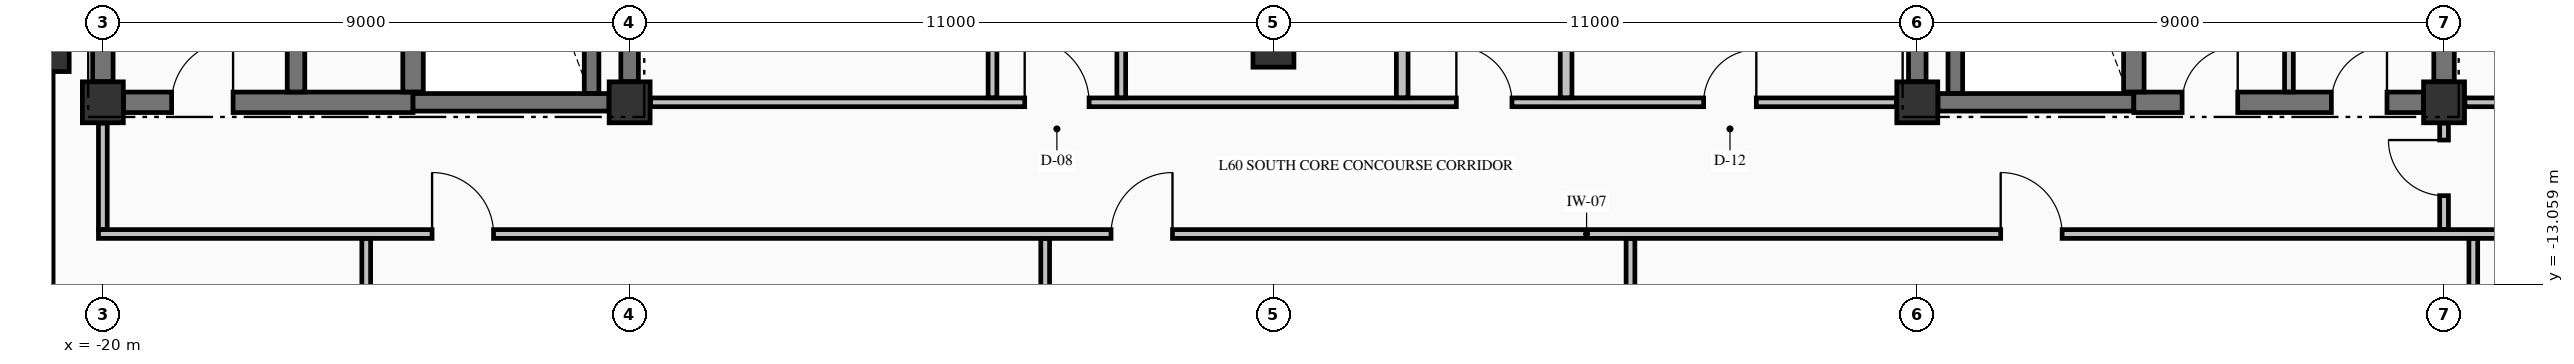
"""IFC4 building model, lengths in metres.
Left out: names, types, materials, properties, quantities, classifications, styles, units other than length and angle.
Written with IfcOpenShell. Run it as: python <this file> out.ifc"""

import sys

from ifc_helpers import new_model, si_unit, direction, frame, frame_2d, origin, origin_2d, place, context, subcontext, project, spatial, rectangle, extrude, element, fill, save


model = new_model("IFC4")
c1 = context("Model", 3, precision=1e-05, world=origin(), true_north=direction((0.0, 1.0)))
c2 = subcontext(c1, "Body", "Model", "MODEL_VIEW")
j1 = project(units=[si_unit("LENGTHUNIT", "METRE"), si_unit("PLANEANGLEUNIT", "RADIAN")], contexts=[c1])
p1 = place(None, origin())
s1 = spatial("IfcSite", under=j1, at=p1, CompositionType="ELEMENT")
p2 = place(p1, origin())
s2 = spatial("IfcBuilding", under=s1, at=p2, CompositionType="ELEMENT")
p3 = place(p2, frame((0.0, 0.0, 230.05)))
s3 = spatial("IfcBuildingStorey", under=s2, at=p3, CompositionType="ELEMENT", Elevation=230.05)
p4 = place(p3, frame((-21.0, -9.0, -0.25), z_axis=(0.0, 0.0, 1.0), x_axis=(1.0, 0.0, 0.0)))
e1 = element("IfcColumn", 1, at=p4, inside=s3, PredefinedType="COLUMN", context=c2, shape_type="SweptSolid", body=[
    extrude(rectangle(XDim=0.85, YDim=0.85, at=origin_2d()), origin(), (0.0, 0.0, 1.0), 3.23),
])
for number, where, z_axis, x_axis in (
    (2, (-20.0, -9.95, -0.25), (0.0, 0.0, 1.0), (1.0, 0.0, 0.0)),
    (3, (-11.0, -9.95, -0.25), (0.0, 0.0, 1.0), (1.0, 0.0, 0.0)),
    (4, (11.0, -9.95, -0.25), (0.0, 0.0, 1.0), (1.0, 0.0, 0.0)),
    (5, (20.0, -9.95, -0.25), (0.0, 0.0, 1.0), (1.0, 0.0, 0.0)),
    (6, (0.0, -9.0, -0.25), (0.0, 0.0, 1.0), (1.0, 0.0, 0.0)),
):
    element("IfcColumn", number, at=place(p3, frame(where, z_axis=z_axis, x_axis=x_axis)), inside=s3, PredefinedType="COLUMN", context=c2, shape_type="SweptSolid", body=[
        extrude(rectangle(XDim=0.7, YDim=0.7, at=origin_2d()), origin(), (0.0, 0.0, 1.0), 3.23),
    ])
p5 = place(p3, frame((-21.0, -9.455, 0.0), z_axis=(0.0, 0.0, 1.0), x_axis=(0.0, -1.0, 0.0)))
e7 = element("IfcWall", 7, at=p5, inside=s3, PredefinedType="STANDARD", context=c2, shape_type="SweptSolid", body=[
    extrude(rectangle(XDim=8.09, YDim=0.3, at=frame_2d((4.045, 0.0))), origin(), (0.0, 0.0, 1.0), 2.372),
])
p6 = place(p3, frame((-19.646, -9.95, 0.0), z_axis=(0.0, 0.0, 1.0), x_axis=(1.0, 0.0, 0.0)))
e8 = element("IfcWall", 8, at=p6, inside=s3, PredefinedType="SHEAR", context=c2, shape_type="SweptSolid", body=[
    extrude(rectangle(XDim=4.946, YDim=0.35, at=frame_2d((2.473, 0.0))), origin(), (0.0, 0.0, 1.0), 2.98),
])
p7 = place(p6, frame((0.821, 0.0, 0.0)))
e9 = element("IfcOpeningElement", 9, at=p7, cuts=e8, PredefinedType="OPENING", context=c2, shape_type="SweptSolid", body=[
    extrude(rectangle(XDim=1.05, YDim=2.15, at=frame_2d((0.525, 1.075))), frame((0.0, 0.185, 0.0), z_axis=(0.0, -1.0, 0.0), x_axis=(1.0, 0.0, 0.0)), (0.0, 0.0, 1.0), 0.37),
])
for number, where, z_axis, x_axis in (
    (10, (-14.7, -9.95, 0.0), (0.0, 0.0, 1.0), (1.0, 0.0, 0.0)),
    (11, (11.354, -9.95, 0.0), (0.0, 0.0, 1.0), (1.0, 0.0, 0.0)),
):
    element("IfcWall", number, at=place(p3, frame(where, z_axis=z_axis, x_axis=x_axis)), inside=s3, PredefinedType="SHEAR", context=c2, shape_type="SweptSolid", body=[
        extrude(rectangle(XDim=3.346, YDim=0.3, at=frame_2d((1.673, 0.0))), origin(), (0.0, 0.0, 1.0), 2.98),
    ])
p8 = place(p3, frame((14.7, -9.95, 0.0), z_axis=(0.0, 0.0, 1.0), x_axis=(1.0, 0.0, 0.0)))
e12 = element("IfcWall", 12, at=p8, inside=s3, PredefinedType="SHEAR", context=c2, shape_type="SweptSolid", body=[
    extrude(rectangle(XDim=4.946, YDim=0.35, at=frame_2d((2.473, 0.0))), origin(), (0.0, 0.0, 1.0), 2.98),
])
p9 = place(p8, frame((0.825, 0.0, 0.0)))
e13 = element("IfcOpeningElement", 13, at=p9, cuts=e12, PredefinedType="OPENING", context=c2, shape_type="SweptSolid", body=[
    extrude(rectangle(XDim=0.95, YDim=2.15, at=frame_2d((0.475, 1.075))), frame((0.0, 0.185, 0.0), z_axis=(0.0, -1.0, 0.0), x_axis=(1.0, 0.0, 0.0)), (0.0, 0.0, 1.0), 0.37),
])
p10 = place(p8, frame((3.375, 0.0, 0.0)))
e14 = element("IfcOpeningElement", 14, at=p10, cuts=e12, PredefinedType="OPENING", context=c2, shape_type="SweptSolid", body=[
    extrude(rectangle(XDim=0.95, YDim=2.15, at=frame_2d((0.475, 1.075))), frame((0.0, 0.185, 0.0), z_axis=(0.0, -1.0, 0.0), x_axis=(1.0, 0.0, 0.0)), (0.0, 0.0, 1.0), 0.37),
])
p11 = place(p3, frame((-20.075, -12.2, 0.0), z_axis=(0.0, 0.0, 1.0), x_axis=(1.0, 0.0, 0.0)))
e15 = element("IfcWall", 15, at=p11, inside=s3, PredefinedType="PARTITIONING", context=c2, shape_type="SweptSolid", body=[
    extrude(rectangle(XDim=45.91, YDim=0.15, at=frame_2d((22.955, 0.0))), origin(), (0.0, 0.0, 1.0), 2.98),
])
p12 = place(p11, frame((5.7, 0.0, 0.0)))
e16 = element("IfcOpeningElement", 16, at=p12, cuts=e15, PredefinedType="OPENING", context=c2, shape_type="SweptSolid", body=[
    extrude(rectangle(XDim=1.05, YDim=2.15, at=frame_2d((0.525, 1.075))), frame((0.0, 0.085, 0.0), z_axis=(0.0, -1.0, 0.0), x_axis=(1.0, 0.0, 0.0)), (0.0, 0.0, 1.0), 0.17),
])
p13 = place(p11, frame((17.3, 0.0, 0.0)))
e17 = element("IfcOpeningElement", 17, at=p13, cuts=e15, PredefinedType="OPENING", context=c2, shape_type="SweptSolid", body=[
    extrude(rectangle(XDim=1.05, YDim=2.15, at=frame_2d((0.525, 1.075))), frame((0.0, 0.085, 0.0), z_axis=(0.0, -1.0, 0.0), x_axis=(1.0, 0.0, 0.0)), (0.0, 0.0, 1.0), 0.17),
])
p14 = place(p11, frame((32.5, 0.0, 0.0)))
e18 = element("IfcOpeningElement", 18, at=p14, cuts=e15, PredefinedType="OPENING", context=c2, shape_type="SweptSolid", body=[
    extrude(rectangle(XDim=1.05, YDim=2.15, at=frame_2d((0.525, 1.075))), frame((0.0, 0.085, 0.0), z_axis=(0.0, -1.0, 0.0), x_axis=(1.0, 0.0, 0.0)), (0.0, 0.0, 1.0), 0.17),
])
p15 = place(p3, frame((-10.644, -9.95, 0.0), z_axis=(0.0, 0.0, 1.0), x_axis=(1.0, 0.0, 0.0)))
e19 = element("IfcWall", 19, at=p15, inside=s3, PredefinedType="PARTITIONING", context=c2, shape_type="SweptSolid", body=[
    extrude(rectangle(XDim=21.288, YDim=0.15, at=frame_2d((10.644, 0.0))), origin(), (0.0, 0.0, 1.0), 2.98),
])
p16 = place(p15, frame((6.394, 0.0, 0.0)))
e20 = element("IfcOpeningElement", 20, at=p16, cuts=e19, PredefinedType="OPENING", context=c2, shape_type="SweptSolid", body=[
    extrude(rectangle(XDim=1.1, YDim=2.15, at=frame_2d((0.55, 1.075))), frame((0.0, 0.085, 0.0), z_axis=(0.0, -1.0, 0.0), x_axis=(1.0, 0.0, 0.0)), (0.0, 0.0, 1.0), 0.17),
])
p17 = place(p15, frame((13.769, 0.0, 0.0)))
e21 = element("IfcOpeningElement", 21, at=p17, cuts=e19, PredefinedType="OPENING", context=c2, shape_type="SweptSolid", body=[
    extrude(rectangle(XDim=0.95, YDim=2.15, at=frame_2d((0.475, 1.075))), frame((0.0, 0.085, 0.0), z_axis=(0.0, -1.0, 0.0), x_axis=(1.0, 0.0, 0.0)), (0.0, 0.0, 1.0), 0.17),
])
p18 = place(p15, frame((17.994, 0.0, 0.0)))
e22 = element("IfcOpeningElement", 22, at=p18, cuts=e19, PredefinedType="OPENING", context=c2, shape_type="SweptSolid", body=[
    extrude(rectangle(XDim=0.9, YDim=2.15, at=frame_2d((0.45, 1.075))), frame((0.0, 0.085, 0.0), z_axis=(0.0, -1.0, 0.0), x_axis=(1.0, 0.0, 0.0)), (0.0, 0.0, 1.0), 0.17),
])
p19 = place(p3, frame((20.356, -9.95, 0.0), z_axis=(0.0, 0.0, 1.0), x_axis=(1.0, 0.0, 0.0)))
e23 = element("IfcWall", 23, at=p19, inside=s3, PredefinedType="PARTITIONING", context=c2, shape_type="SweptSolid", body=[
    extrude(rectangle(XDim=5.479, YDim=0.15, at=frame_2d((2.74, 0.0))), origin(), (0.0, 0.0, 1.0), 2.98),
])
p20 = place(p19, frame((2.144, 0.0, 0.0)))
e24 = element("IfcOpeningElement", 24, at=p20, cuts=e23, PredefinedType="OPENING", context=c2, shape_type="SweptSolid", body=[
    extrude(rectangle(XDim=1.0, YDim=2.15, at=frame_2d((0.5, 1.075))), frame((0.0, 0.085, 0.0), z_axis=(0.0, -1.0, 0.0), x_axis=(1.0, 0.0, 0.0)), (0.0, 0.0, 1.0), 0.17),
])
p21 = place(p3, frame((-20.0, -9.596, 0.0), z_axis=(0.0, 0.0, 1.0), x_axis=(0.0, 1.0, 0.0)))
e25 = element("IfcWall", 25, at=p21, inside=s3, PredefinedType="SHEAR", context=c2, shape_type="SweptSolid", body=[
    extrude(rectangle(XDim=9.194, YDim=0.35, at=frame_2d((4.597, 0.0))), origin(), (0.0, 0.0, 1.0), 2.98),
])
p22 = place(p3, frame((-16.7, -9.773, 0.0), z_axis=(0.0, 0.0, 1.0), x_axis=(0.0, 1.0, 0.0)))
e26 = element("IfcWall", 26, at=p22, inside=s3, PredefinedType="SHEAR", context=c2, shape_type="SweptSolid", body=[
    extrude(rectangle(XDim=9.371, YDim=0.3, at=frame_2d((4.686, 0.0))), origin(), (0.0, 0.0, 1.0), 2.98),
])
p23 = place(p3, frame((-14.7, -9.773, 0.0), z_axis=(0.0, 0.0, 1.0), x_axis=(0.0, 1.0, 0.0)))
e27 = element("IfcWall", 27, at=p23, inside=s3, PredefinedType="SHEAR", context=c2, shape_type="SweptSolid", body=[
    extrude(rectangle(XDim=9.371, YDim=0.35, at=frame_2d((4.686, 0.0))), origin(), (0.0, 0.0, 1.0), 2.98),
])
p24 = place(p3, frame((-11.65, -9.798, 0.0), z_axis=(0.0, 0.0, 1.0), x_axis=(0.0, 1.0, 0.0)))
e28 = element("IfcWall", 28, at=p24, inside=s3, PredefinedType="SOLIDWALL", context=c2, shape_type="SweptSolid", body=[
    extrude(rectangle(XDim=9.396, YDim=0.25, at=frame_2d((4.698, 0.0))), origin(), (0.0, 0.0, 1.0), 2.98),
])
for number, where, z_axis, x_axis in (
    (29, (-11.0, -9.596, 0.0), (0.0, 0.0, 1.0), (0.0, 1.0, 0.0)),
    (30, (11.0, -9.596, 0.0), (0.0, 0.0, 1.0), (0.0, 1.0, 0.0)),
):
    element("IfcWall", number, at=place(p3, frame(where, z_axis=z_axis, x_axis=x_axis)), inside=s3, PredefinedType="SHEAR", context=c2, shape_type="SweptSolid", body=[
        extrude(rectangle(XDim=9.242, YDim=0.3, at=frame_2d((4.621, 0.0))), origin(), (0.0, 0.0, 1.0), 2.98),
    ])
p25 = place(p3, frame((11.65, -9.798, 0.0), z_axis=(0.0, 0.0, 1.0), x_axis=(0.0, 1.0, 0.0)))
e31 = element("IfcWall", 31, at=p25, inside=s3, PredefinedType="SOLIDWALL", context=c2, shape_type="SweptSolid", body=[
    extrude(rectangle(XDim=9.396, YDim=0.25, at=frame_2d((4.698, 0.0))), origin(), (0.0, 0.0, 1.0), 2.98),
])
p26 = place(p3, frame((14.7, -9.773, 0.0), z_axis=(0.0, 0.0, 1.0), x_axis=(0.0, 1.0, 0.0)))
e32 = element("IfcWall", 32, at=p26, inside=s3, PredefinedType="SHEAR", context=c2, shape_type="SweptSolid", body=[
    extrude(rectangle(XDim=9.371, YDim=0.35, at=frame_2d((4.686, 0.0))), origin(), (0.0, 0.0, 1.0), 2.98),
])
p27 = place(p3, frame((20.0, -9.596, 0.0), z_axis=(0.0, 0.0, 1.0), x_axis=(0.0, 1.0, 0.0)))
e33 = element("IfcWall", 33, at=p27, inside=s3, PredefinedType="SHEAR", context=c2, shape_type="SweptSolid", body=[
    extrude(rectangle(XDim=9.242, YDim=0.35, at=frame_2d((4.621, 0.0))), origin(), (0.0, 0.0, 1.0), 2.98),
])
p28 = place(p3, frame((-20.0, -12.122, 0.0), z_axis=(0.0, 0.0, 1.0), x_axis=(0.0, 1.0, 0.0)))
e34 = element("IfcWall", 34, at=p28, inside=s3, PredefinedType="PARTITIONING", context=c2, shape_type="SweptSolid", body=[
    extrude(rectangle(XDim=1.816, YDim=0.15, at=frame_2d((0.908, 0.0))), origin(), (0.0, 0.0, 1.0), 2.57),
])
p29 = place(p3, frame((-15.5, -17.569, 0.0), z_axis=(0.0, 0.0, 1.0), x_axis=(0.0, 1.0, 0.0)))
e35 = element("IfcWall", 35, at=p29, inside=s3, PredefinedType="PARTITIONING", context=c2, shape_type="SweptSolid", body=[
    extrude(rectangle(XDim=5.291, YDim=0.15, at=frame_2d((2.646, 0.0))), origin(), (0.0, 0.0, 1.0), 2.98),
])
p30 = place(p3, frame((-4.8, -9.872, 0.0), z_axis=(0.0, 0.0, 1.0), x_axis=(0.0, 1.0, 0.0)))
e36 = element("IfcWall", 36, at=p30, inside=s3, PredefinedType="PARTITIONING", context=c2, shape_type="SweptSolid", body=[
    extrude(rectangle(XDim=9.544, YDim=0.15, at=frame_2d((4.772, 0.0))), origin(), (0.0, 0.0, 1.0), 2.98),
])
p31 = place(p3, frame((-3.9, -23.335, 0.0), z_axis=(0.0, 0.0, 1.0), x_axis=(0.0, 1.0, 0.0)))
e37 = element("IfcWall", 37, at=p31, inside=s3, PredefinedType="PARTITIONING", context=c2, shape_type="SweptSolid", body=[
    extrude(rectangle(XDim=11.057, YDim=0.15, at=frame_2d((5.528, 0.0))), origin(), (0.0, 0.0, 1.0), 2.98),
])
p32 = place(p3, frame((-2.6, -9.872, 0.0), z_axis=(0.0, 0.0, 1.0), x_axis=(0.0, 1.0, 0.0)))
e38 = element("IfcWall", 38, at=p32, inside=s3, PredefinedType="PARTITIONING", context=c2, shape_type="SweptSolid", body=[
    extrude(rectangle(XDim=4.419, YDim=0.15, at=frame_2d((2.209, 0.0))), origin(), (0.0, 0.0, 1.0), 2.98),
])
p33 = place(p32, frame((2.597, 0.0, 0.0)))
e39 = element("IfcOpeningElement", 39, at=p33, cuts=e38, PredefinedType="OPENING", context=c2, shape_type="SweptSolid", body=[
    extrude(rectangle(XDim=0.95, YDim=2.15, at=frame_2d((0.475, 1.075))), frame((0.0, 0.085, 0.0), z_axis=(0.0, -1.0, 0.0), x_axis=(1.0, 0.0, 0.0)), (0.0, 0.0, 1.0), 0.17),
])
for number, where, z_axis, x_axis in (
    (40, (2.2, -9.872, 0.0), (0.0, 0.0, 1.0), (0.0, 1.0, 0.0)),
    (41, (5.0, -9.872, 0.0), (0.0, 0.0, 1.0), (0.0, 1.0, 0.0)),
):
    element("IfcWall", number, at=place(p3, frame(where, z_axis=z_axis, x_axis=x_axis)), inside=s3, PredefinedType="PARTITIONING", context=c2, shape_type="SweptSolid", body=[
        extrude(rectangle(XDim=4.419, YDim=0.2, at=frame_2d((2.209, 0.0))), origin(), (0.0, 0.0, 1.0), 2.98),
    ])
p34 = place(p3, frame((6.1, -23.335, 0.0), z_axis=(0.0, 0.0, 1.0), x_axis=(0.0, 1.0, 0.0)))
e42 = element("IfcWall", 42, at=p34, inside=s3, PredefinedType="PARTITIONING", context=c2, shape_type="SweptSolid", body=[
    extrude(rectangle(XDim=11.057, YDim=0.15, at=frame_2d((5.528, 0.0))), origin(), (0.0, 0.0, 1.0), 2.98),
])
p35 = place(p3, frame((17.35, -9.772, 0.0), z_axis=(0.0, 0.0, 1.0), x_axis=(0.0, 1.0, 0.0)))
e43 = element("IfcWall", 43, at=p35, inside=s3, PredefinedType="PARTITIONING", context=c2, shape_type="SweptSolid", body=[
    extrude(rectangle(XDim=7.194, YDim=0.15, at=frame_2d((3.597, 0.0))), origin(), (0.0, 0.0, 1.0), 2.98),
])
p36 = place(p3, frame((20.0, -12.122, 0.0), z_axis=(0.0, 0.0, 1.0), x_axis=(0.0, 1.0, 0.0)))
e44 = element("IfcWall", 44, at=p36, inside=s3, PredefinedType="PARTITIONING", context=c2, shape_type="SweptSolid", body=[
    extrude(rectangle(XDim=1.816, YDim=0.15, at=frame_2d((0.908, 0.0))), origin(), (0.0, 0.0, 1.0), 2.98),
])
p37 = place(p36, frame((0.577, 0.0, 0.0)))
e45 = element("IfcOpeningElement", 45, at=p37, cuts=e44, PredefinedType="OPENING", context=c2, shape_type="SweptSolid", body=[
    extrude(rectangle(XDim=0.95, YDim=2.15, at=frame_2d((0.475, 1.075))), frame((0.0, 0.085, 0.0), z_axis=(0.0, -1.0, 0.0), x_axis=(1.0, 0.0, 0.0)), (0.0, 0.0, 1.0), 0.17),
])
p38 = place(p3, frame((20.5, -17.569, 0.0), z_axis=(0.0, 0.0, 1.0), x_axis=(0.0, 1.0, 0.0)))
e46 = element("IfcWall", 46, at=p38, inside=s3, PredefinedType="PARTITIONING", context=c2, shape_type="SweptSolid", body=[
    extrude(rectangle(XDim=5.291, YDim=0.15, at=frame_2d((2.646, 0.0))), origin(), (0.0, 0.0, 1.0), 2.98),
])
p39 = place(p7, origin())
e47 = element("IfcDoor", 47, at=p39, inside=s3, OperationType="SINGLE_SWING_RIGHT", PredefinedType="DOOR", context=c2, shape_type="SweptSolid", body=[
    extrude(rectangle(XDim=1.05, YDim=2.15, at=frame_2d((0.525, 1.075))), frame((0.0, 0.025, 0.0), z_axis=(0.0, -1.0, 0.0), x_axis=(1.0, 0.0, 0.0)), (0.0, 0.0, 1.0), 0.05),
])
fill(e9, e47)
p40 = place(p9, origin())
e48 = element("IfcDoor", 48, at=p40, inside=s3, OperationType="SINGLE_SWING_RIGHT", PredefinedType="DOOR", context=c2, shape_type="SweptSolid", body=[
    extrude(rectangle(XDim=0.95, YDim=2.15, at=frame_2d((0.475, 1.075))), frame((0.0, 0.025, 0.0), z_axis=(0.0, -1.0, 0.0), x_axis=(1.0, 0.0, 0.0)), (0.0, 0.0, 1.0), 0.05),
])
fill(e13, e48)
p41 = place(p10, origin())
e49 = element("IfcDoor", 49, at=p41, inside=s3, OperationType="SINGLE_SWING_RIGHT", PredefinedType="DOOR", context=c2, shape_type="SweptSolid", body=[
    extrude(rectangle(XDim=0.95, YDim=2.15, at=frame_2d((0.475, 1.075))), frame((0.0, 0.025, 0.0), z_axis=(0.0, -1.0, 0.0), x_axis=(1.0, 0.0, 0.0)), (0.0, 0.0, 1.0), 0.05),
])
fill(e14, e49)
p42 = place(p16, origin())
e50 = element("IfcDoor", 50, at=p42, inside=s3, OperationType="SINGLE_SWING_LEFT", PredefinedType="DOOR", context=c2, shape_type="SweptSolid", body=[
    extrude(rectangle(XDim=1.1, YDim=2.15, at=frame_2d((0.55, 1.075))), frame((0.0, 0.025, 0.0), z_axis=(0.0, -1.0, 0.0), x_axis=(1.0, 0.0, 0.0)), (0.0, 0.0, 1.0), 0.05),
])
fill(e20, e50)
p43 = place(p12, origin())
e51 = element("IfcDoor", 51, at=p43, inside=s3, OperationType="SINGLE_SWING_LEFT", PredefinedType="DOOR", context=c2, shape_type="SweptSolid", body=[
    extrude(rectangle(XDim=1.05, YDim=2.15, at=frame_2d((0.525, 1.075))), frame((0.0, 0.025, 0.0), z_axis=(0.0, -1.0, 0.0), x_axis=(1.0, 0.0, 0.0)), (0.0, 0.0, 1.0), 0.05),
])
fill(e16, e51)
p44 = place(p13, origin())
e52 = element("IfcDoor", 52, at=p44, inside=s3, OperationType="SINGLE_SWING_RIGHT", PredefinedType="DOOR", context=c2, shape_type="SweptSolid", body=[
    extrude(rectangle(XDim=1.05, YDim=2.15, at=frame_2d((0.525, 1.075))), frame((0.0, 0.025, 0.0), z_axis=(0.0, -1.0, 0.0), x_axis=(1.0, 0.0, 0.0)), (0.0, 0.0, 1.0), 0.05),
])
fill(e17, e52)
p45 = place(p14, origin())
e53 = element("IfcDoor", 53, at=p45, inside=s3, OperationType="SINGLE_SWING_LEFT", PredefinedType="DOOR", context=c2, shape_type="SweptSolid", body=[
    extrude(rectangle(XDim=1.05, YDim=2.15, at=frame_2d((0.525, 1.075))), frame((0.0, 0.025, 0.0), z_axis=(0.0, -1.0, 0.0), x_axis=(1.0, 0.0, 0.0)), (0.0, 0.0, 1.0), 0.05),
])
fill(e18, e53)
p46 = place(p17, origin())
e54 = element("IfcDoor", 54, at=p46, inside=s3, OperationType="SINGLE_SWING_LEFT", PredefinedType="DOOR", context=c2, shape_type="SweptSolid", body=[
    extrude(rectangle(XDim=0.95, YDim=2.15, at=frame_2d((0.475, 1.075))), frame((0.0, 0.025, 0.0), z_axis=(0.0, -1.0, 0.0), x_axis=(1.0, 0.0, 0.0)), (0.0, 0.0, 1.0), 0.05),
])
fill(e21, e54)
p47 = place(p18, origin())
e55 = element("IfcDoor", 55, at=p47, inside=s3, OperationType="SINGLE_SWING_RIGHT", PredefinedType="DOOR", context=c2, shape_type="SweptSolid", body=[
    extrude(rectangle(XDim=0.9, YDim=2.15, at=frame_2d((0.45, 1.075))), frame((0.0, 0.025, 0.0), z_axis=(0.0, -1.0, 0.0), x_axis=(1.0, 0.0, 0.0)), (0.0, 0.0, 1.0), 0.05),
])
fill(e22, e55)
p48 = place(p37, origin())
e56 = element("IfcDoor", 56, at=p48, inside=s3, OperationType="SINGLE_SWING_RIGHT", PredefinedType="DOOR", context=c2, shape_type="SweptSolid", body=[
    extrude(rectangle(XDim=0.95, YDim=2.15, at=frame_2d((0.475, 1.075))), frame((0.0, 0.025, 0.0), z_axis=(0.0, -1.0, 0.0), x_axis=(1.0, 0.0, 0.0)), (0.0, 0.0, 1.0), 0.05),
])
fill(e45, e56)
save(model, sys.argv[1])
